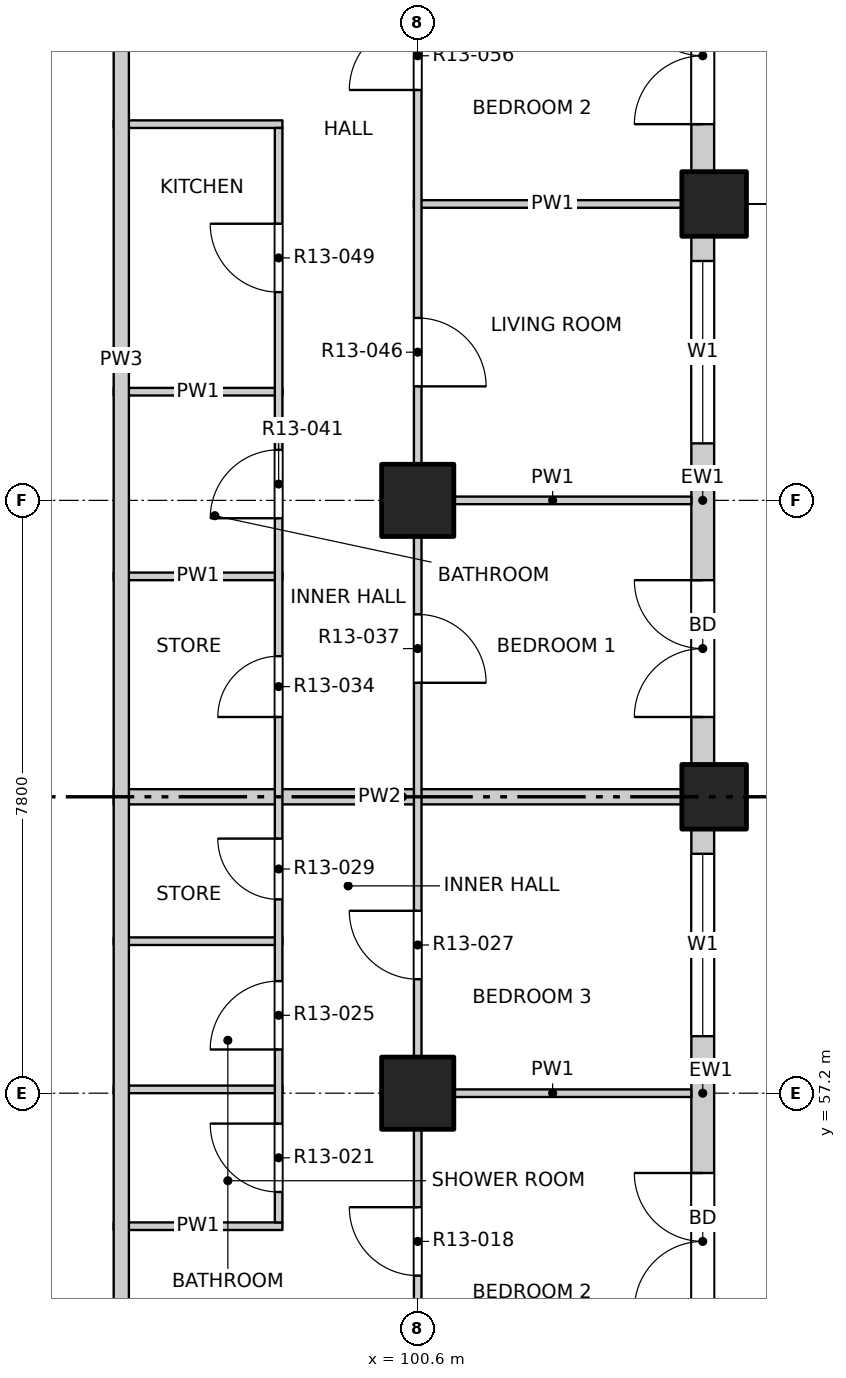
"""IFC4 building model, lengths in metres.
Left out: names, types, materials, properties, quantities, classifications, styles, units other than length and angle.
Written with IfcOpenShell. Run it as: python <this file> out.ifc"""

import sys

from ifc_helpers import new_model, si_unit, direction, frame, frame_2d, origin, origin_2d, place, context, subcontext, project, spatial, rectangle, extrude, element, fill, save


model = new_model("IFC4")
c1 = context("Model", 3, precision=1e-05, world=origin(), true_north=direction((0.0, 1.0)))
c2 = subcontext(c1, "Body", "Model", "MODEL_VIEW")
j1 = project(units=[si_unit("LENGTHUNIT", "METRE"), si_unit("PLANEANGLEUNIT", "RADIAN")], contexts=[c1])
p1 = place(None, origin())
s1 = spatial("IfcSite", under=j1, at=p1, CompositionType="ELEMENT")
p2 = place(p1, origin())
s2 = spatial("IfcBuilding", under=s1, at=p2, CompositionType="ELEMENT")
p3 = place(p2, frame((0.0, 0.0, 140.7)))
s3 = spatial("IfcBuildingStorey", under=s2, at=p3, CompositionType="ELEMENT", Elevation=140.7)
for number, where, z_axis, x_axis in (
    (1, (104.5, 61.1, -0.25), (0.0, 0.0, 1.0), (1.0, 0.0, 0.0)),
    (2, (104.5, 68.9, -0.25), (0.0, 0.0, 1.0), (1.0, 0.0, 0.0)),
):
    element("IfcColumn", number, at=place(p3, frame(where, z_axis=z_axis, x_axis=x_axis)), inside=s3, PredefinedType="COLUMN", context=c2, shape_type="SweptSolid", body=[
        extrude(rectangle(XDim=0.85, YDim=0.85, at=origin_2d()), origin(), (0.0, 0.0, 1.0), 3.35),
    ])
for number, where, z_axis, x_axis in (
    (3, (100.6, 57.2, -0.25), (0.0, 0.0, 1.0), (1.0, 0.0, 0.0)),
    (4, (100.6, 65.0, -0.25), (0.0, 0.0, 1.0), (1.0, 0.0, 0.0)),
):
    element("IfcColumn", number, at=place(p3, frame(where, z_axis=z_axis, x_axis=x_axis)), inside=s3, PredefinedType="COLUMN", context=c2, shape_type="SweptSolid", body=[
        extrude(rectangle(XDim=0.95, YDim=0.95, at=origin_2d()), origin(), (0.0, 0.0, 1.0), 3.35),
    ])
p4 = place(p3, frame((104.35, 53.725, 0.0), z_axis=(0.0, 0.0, 1.0), x_axis=(0.0, 1.0, 0.0)))
e5 = element("IfcWall", 5, at=p4, inside=s3, PredefinedType="SOLIDWALL", context=c2, shape_type="SweptSolid", body=[
    extrude(rectangle(XDim=6.95, YDim=0.3, at=frame_2d((3.475, 0.0))), origin(), (0.0, 0.0, 1.0), 3.1),
])
p5 = place(p4, frame((0.625, 0.0, 0.0)))
e6 = element("IfcOpeningElement", 6, at=p5, cuts=e5, PredefinedType="OPENING", context=c2, shape_type="SweptSolid", body=[
    extrude(rectangle(XDim=1.8, YDim=2.4, at=frame_2d((0.9, 1.2))), frame((0.0, 0.16, 0.0), z_axis=(0.0, -1.0, 0.0), x_axis=(1.0, 0.0, 0.0)), (0.0, 0.0, 1.0), 0.32),
])
p6 = place(p4, frame((4.225, 0.0, 0.9)))
e7 = element("IfcOpeningElement", 7, at=p6, cuts=e5, PredefinedType="OPENING", context=c2, shape_type="SweptSolid", body=[
    extrude(rectangle(XDim=2.4, YDim=1.8, at=frame_2d((1.2, 0.9))), frame((0.0, 0.16, 0.0), z_axis=(0.0, -1.0, 0.0), x_axis=(1.0, 0.0, 0.0)), (0.0, 0.0, 1.0), 0.32),
])
p7 = place(p3, frame((104.35, 61.525, 0.0), z_axis=(0.0, 0.0, 1.0), x_axis=(0.0, 1.0, 0.0)))
e8 = element("IfcWall", 8, at=p7, inside=s3, PredefinedType="SOLIDWALL", context=c2, shape_type="SweptSolid", body=[
    extrude(rectangle(XDim=6.95, YDim=0.3, at=frame_2d((3.475, 0.0))), origin(), (0.0, 0.0, 1.0), 3.1),
])
p8 = place(p7, frame((0.625, 0.0, 0.0)))
e9 = element("IfcOpeningElement", 9, at=p8, cuts=e8, PredefinedType="OPENING", context=c2, shape_type="SweptSolid", body=[
    extrude(rectangle(XDim=1.8, YDim=2.4, at=frame_2d((0.9, 1.2))), frame((0.0, 0.16, 0.0), z_axis=(0.0, -1.0, 0.0), x_axis=(1.0, 0.0, 0.0)), (0.0, 0.0, 1.0), 0.32),
])
p9 = place(p7, frame((4.225, 0.0, 0.9)))
e10 = element("IfcOpeningElement", 10, at=p9, cuts=e8, PredefinedType="OPENING", context=c2, shape_type="SweptSolid", body=[
    extrude(rectangle(XDim=2.4, YDim=1.8, at=frame_2d((1.2, 0.9))), frame((0.0, 0.16, 0.0), z_axis=(0.0, -1.0, 0.0), x_axis=(1.0, 0.0, 0.0)), (0.0, 0.0, 1.0), 0.32),
])
p10 = place(p3, frame((104.35, 69.325, 0.0), z_axis=(0.0, 0.0, 1.0), x_axis=(0.0, 1.0, 0.0)))
e11 = element("IfcWall", 11, at=p10, inside=s3, PredefinedType="SOLIDWALL", context=c2, shape_type="SweptSolid", body=[
    extrude(rectangle(XDim=6.95, YDim=0.3, at=frame_2d((3.475, 0.0))), origin(), (0.0, 0.0, 1.0), 3.1),
])
p11 = place(p10, frame((0.625, 0.0, 0.0)))
e12 = element("IfcOpeningElement", 12, at=p11, cuts=e11, PredefinedType="OPENING", context=c2, shape_type="SweptSolid", body=[
    extrude(rectangle(XDim=1.8, YDim=2.4, at=frame_2d((0.9, 1.2))), frame((0.0, 0.16, 0.0), z_axis=(0.0, -1.0, 0.0), x_axis=(1.0, 0.0, 0.0)), (0.0, 0.0, 1.0), 0.32),
])
p12 = place(p10, frame((4.225, 0.0, 0.9)))
e13 = element("IfcOpeningElement", 13, at=p12, cuts=e11, PredefinedType="OPENING", context=c2, shape_type="SweptSolid", body=[
    extrude(rectangle(XDim=2.4, YDim=1.8, at=frame_2d((1.2, 0.9))), frame((0.0, 0.16, 0.0), z_axis=(0.0, -1.0, 0.0), x_axis=(1.0, 0.0, 0.0)), (0.0, 0.0, 1.0), 0.32),
])
p13 = place(p3, frame((96.6, 55.45, 0.0), z_axis=(0.0, 0.0, 1.0), x_axis=(1.0, 0.0, 0.0)))
e14 = element("IfcWall", 14, at=p13, inside=s3, PredefinedType="PARTITIONING", context=c2, shape_type="SweptSolid", body=[
    extrude(rectangle(XDim=2.22, YDim=0.1, at=frame_2d((1.11, 0.0))), origin(), (0.0, 0.0, 1.0), 3.1),
])
p14 = place(p3, frame((100.55, 57.2, 0.0), z_axis=(0.0, 0.0, 1.0), x_axis=(1.0, 0.0, 0.0)))
e15 = element("IfcWall", 15, at=p14, inside=s3, PredefinedType="PARTITIONING", context=c2, shape_type="SweptSolid", body=[
    extrude(rectangle(XDim=3.65, YDim=0.1, at=frame_2d((1.825, 0.0))), origin(), (0.0, 0.0, 1.0), 3.1),
])
for number, where, z_axis, x_axis in (
    (16, (96.6, 57.25, 0.0), (0.0, 0.0, 1.0), (1.0, 0.0, 0.0)),
    (17, (96.6, 59.2, 0.0), (0.0, 0.0, 1.0), (1.0, 0.0, 0.0)),
):
    element("IfcWall", number, at=place(p3, frame(where, z_axis=z_axis, x_axis=x_axis)), inside=s3, PredefinedType="PARTITIONING", context=c2, shape_type="SweptSolid", body=[
        extrude(rectangle(XDim=2.22, YDim=0.1, at=frame_2d((1.11, 0.0))), origin(), (0.0, 0.0, 1.0), 3.1),
    ])
p15 = place(p3, frame((96.6, 61.1, 0.0), z_axis=(0.0, 0.0, 1.0), x_axis=(1.0, 0.0, 0.0)))
e18 = element("IfcWall", 18, at=p15, inside=s3, PredefinedType="PARTITIONING", context=c2, shape_type="SweptSolid", body=[
    extrude(rectangle(XDim=7.6, YDim=0.2, at=frame_2d((3.8, 0.0))), origin(), (0.0, 0.0, 1.0), 3.1),
])
p16 = place(p3, frame((96.6, 64.0, 0.0), z_axis=(0.0, 0.0, 1.0), x_axis=(1.0, 0.0, 0.0)))
e19 = element("IfcWall", 19, at=p16, inside=s3, PredefinedType="PARTITIONING", context=c2, shape_type="SweptSolid", body=[
    extrude(rectangle(XDim=2.22, YDim=0.1, at=frame_2d((1.11, 0.0))), origin(), (0.0, 0.0, 1.0), 3.1),
])
p17 = place(p3, frame((100.55, 65.0, 0.0), z_axis=(0.0, 0.0, 1.0), x_axis=(1.0, 0.0, 0.0)))
e20 = element("IfcWall", 20, at=p17, inside=s3, PredefinedType="PARTITIONING", context=c2, shape_type="SweptSolid", body=[
    extrude(rectangle(XDim=3.65, YDim=0.1, at=frame_2d((1.825, 0.0))), origin(), (0.0, 0.0, 1.0), 3.1),
])
p18 = place(p3, frame((96.6, 66.43, 0.0), z_axis=(0.0, 0.0, 1.0), x_axis=(1.0, 0.0, 0.0)))
e21 = element("IfcWall", 21, at=p18, inside=s3, PredefinedType="PARTITIONING", context=c2, shape_type="SweptSolid", body=[
    extrude(rectangle(XDim=2.22, YDim=0.1, at=frame_2d((1.11, 0.0))), origin(), (0.0, 0.0, 1.0), 3.1),
])
p19 = place(p3, frame((100.55, 68.9, 0.0), z_axis=(0.0, 0.0, 1.0), x_axis=(1.0, 0.0, 0.0)))
e22 = element("IfcWall", 22, at=p19, inside=s3, PredefinedType="PARTITIONING", context=c2, shape_type="SweptSolid", body=[
    extrude(rectangle(XDim=3.65, YDim=0.1, at=frame_2d((1.825, 0.0))), origin(), (0.0, 0.0, 1.0), 3.1),
])
p20 = place(p3, frame((96.6, 69.95, 0.0), z_axis=(0.0, 0.0, 1.0), x_axis=(1.0, 0.0, 0.0)))
e23 = element("IfcWall", 23, at=p20, inside=s3, PredefinedType="PARTITIONING", context=c2, shape_type="SweptSolid", body=[
    extrude(rectangle(XDim=2.22, YDim=0.1, at=frame_2d((1.11, 0.0))), origin(), (0.0, 0.0, 1.0), 3.1),
])
p21 = place(p3, frame((96.7, 49.5, 0.0), z_axis=(0.0, 0.0, 1.0), x_axis=(0.0, 1.0, 0.0)))
e24 = element("IfcWall", 24, at=p21, inside=s3, PredefinedType="PARTITIONING", context=c2, shape_type="SweptSolid", body=[
    extrude(rectangle(XDim=34.7, YDim=0.2, at=frame_2d((17.35, 0.0))), origin(), (0.0, 0.0, 1.0), 3.1),
])
p22 = place(p21, frame((3.675, 0.0, 0.0)))
e25 = element("IfcOpeningElement", 25, at=p22, cuts=e24, PredefinedType="OPENING", context=c2, shape_type="SweptSolid", body=[
    extrude(rectangle(XDim=1.0, YDim=2.1, at=frame_2d((0.5, 1.05))), frame((0.0, 0.11, 0.0), z_axis=(0.0, -1.0, 0.0), x_axis=(1.0, 0.0, 0.0)), (0.0, 0.0, 1.0), 0.22),
])
p23 = place(p21, frame((21.725, 0.0, 0.0)))
e26 = element("IfcOpeningElement", 26, at=p23, cuts=e24, PredefinedType="OPENING", context=c2, shape_type="SweptSolid", body=[
    extrude(rectangle(XDim=1.0, YDim=2.1, at=frame_2d((0.5, 1.05))), frame((0.0, 0.11, 0.0), z_axis=(0.0, -1.0, 0.0), x_axis=(1.0, 0.0, 0.0)), (0.0, 0.0, 1.0), 0.22),
])
p24 = place(p21, frame((29.125, 0.0, 0.0)))
e27 = element("IfcOpeningElement", 27, at=p24, cuts=e24, PredefinedType="OPENING", context=c2, shape_type="SweptSolid", body=[
    extrude(rectangle(XDim=1.0, YDim=2.1, at=frame_2d((0.5, 1.05))), frame((0.0, 0.11, 0.0), z_axis=(0.0, -1.0, 0.0), x_axis=(1.0, 0.0, 0.0)), (0.0, 0.0, 1.0), 0.22),
])
p25 = place(p3, frame((98.77, 55.5, 0.0), z_axis=(0.0, 0.0, 1.0), x_axis=(0.0, 1.0, 0.0)))
e28 = element("IfcWall", 28, at=p25, inside=s3, PredefinedType="PARTITIONING", context=c2, shape_type="SweptSolid", body=[
    extrude(rectangle(XDim=14.4, YDim=0.1, at=frame_2d((7.2, 0.0))), origin(), (0.0, 0.0, 1.0), 3.1),
])
p26 = place(p25, frame((0.4, 0.0, 0.0)))
e29 = element("IfcOpeningElement", 29, at=p26, cuts=e28, PredefinedType="OPENING", context=c2, shape_type="SweptSolid", body=[
    extrude(rectangle(XDim=0.9, YDim=2.1, at=frame_2d((0.45, 1.05))), frame((0.0, 0.06, 0.0), z_axis=(0.0, -1.0, 0.0), x_axis=(1.0, 0.0, 0.0)), (0.0, 0.0, 1.0), 0.12),
])
p27 = place(p25, frame((2.275, 0.0, 0.0)))
e30 = element("IfcOpeningElement", 30, at=p27, cuts=e28, PredefinedType="OPENING", context=c2, shape_type="SweptSolid", body=[
    extrude(rectangle(XDim=0.9, YDim=2.1, at=frame_2d((0.45, 1.05))), frame((0.0, 0.06, 0.0), z_axis=(0.0, -1.0, 0.0), x_axis=(1.0, 0.0, 0.0)), (0.0, 0.0, 1.0), 0.12),
])
p28 = place(p25, frame((4.25, 0.0, 0.0)))
e31 = element("IfcOpeningElement", 31, at=p28, cuts=e28, PredefinedType="OPENING", context=c2, shape_type="SweptSolid", body=[
    extrude(rectangle(XDim=0.8, YDim=2.1, at=frame_2d((0.4, 1.05))), frame((0.0, 0.06, 0.0), z_axis=(0.0, -1.0, 0.0), x_axis=(1.0, 0.0, 0.0)), (0.0, 0.0, 1.0), 0.12),
])
p29 = place(p25, frame((6.65, 0.0, 0.0)))
e32 = element("IfcOpeningElement", 32, at=p29, cuts=e28, PredefinedType="OPENING", context=c2, shape_type="SweptSolid", body=[
    extrude(rectangle(XDim=0.8, YDim=2.1, at=frame_2d((0.4, 1.05))), frame((0.0, 0.06, 0.0), z_axis=(0.0, -1.0, 0.0), x_axis=(1.0, 0.0, 0.0)), (0.0, 0.0, 1.0), 0.12),
])
p30 = place(p25, frame((9.265, 0.0, 0.0)))
e33 = element("IfcOpeningElement", 33, at=p30, cuts=e28, PredefinedType="OPENING", context=c2, shape_type="SweptSolid", body=[
    extrude(rectangle(XDim=0.9, YDim=2.1, at=frame_2d((0.45, 1.05))), frame((0.0, 0.06, 0.0), z_axis=(0.0, -1.0, 0.0), x_axis=(1.0, 0.0, 0.0)), (0.0, 0.0, 1.0), 0.12),
])
p31 = place(p25, frame((12.24, 0.0, 0.0)))
e34 = element("IfcOpeningElement", 34, at=p31, cuts=e28, PredefinedType="OPENING", context=c2, shape_type="SweptSolid", body=[
    extrude(rectangle(XDim=0.9, YDim=2.1, at=frame_2d((0.45, 1.05))), frame((0.0, 0.06, 0.0), z_axis=(0.0, -1.0, 0.0), x_axis=(1.0, 0.0, 0.0)), (0.0, 0.0, 1.0), 0.12),
])
p32 = place(p3, frame((100.6, 45.8, 0.0), z_axis=(0.0, 0.0, 1.0), x_axis=(0.0, 1.0, 0.0)))
e35 = element("IfcWall", 35, at=p32, inside=s3, PredefinedType="PARTITIONING", context=c2, shape_type="SweptSolid", body=[
    extrude(rectangle(XDim=38.4, YDim=0.1, at=frame_2d((19.2, 0.0))), origin(), (0.0, 0.0, 1.0), 3.1),
])
p33 = place(p32, frame((1.05, 0.0, 0.0)))
e36 = element("IfcOpeningElement", 36, at=p33, cuts=e35, PredefinedType="OPENING", context=c2, shape_type="SweptSolid", body=[
    extrude(rectangle(XDim=1.2, YDim=2.1, at=frame_2d((0.6, 1.05))), frame((0.0, 0.06, 0.0), z_axis=(0.0, -1.0, 0.0), x_axis=(1.0, 0.0, 0.0)), (0.0, 0.0, 1.0), 0.12),
])
p34 = place(p32, frame((5.1, 0.0, 0.0)))
e37 = element("IfcOpeningElement", 37, at=p34, cuts=e35, PredefinedType="OPENING", context=c2, shape_type="SweptSolid", body=[
    extrude(rectangle(XDim=0.9, YDim=2.1, at=frame_2d((0.45, 1.05))), frame((0.0, 0.06, 0.0), z_axis=(0.0, -1.0, 0.0), x_axis=(1.0, 0.0, 0.0)), (0.0, 0.0, 1.0), 0.12),
])
p35 = place(p32, frame((9.0, 0.0, 0.0)))
e38 = element("IfcOpeningElement", 38, at=p35, cuts=e35, PredefinedType="OPENING", context=c2, shape_type="SweptSolid", body=[
    extrude(rectangle(XDim=0.9, YDim=2.1, at=frame_2d((0.45, 1.05))), frame((0.0, 0.06, 0.0), z_axis=(0.0, -1.0, 0.0), x_axis=(1.0, 0.0, 0.0)), (0.0, 0.0, 1.0), 0.12),
])
p36 = place(p32, frame((12.9, 0.0, 0.0)))
e39 = element("IfcOpeningElement", 39, at=p36, cuts=e35, PredefinedType="OPENING", context=c2, shape_type="SweptSolid", body=[
    extrude(rectangle(XDim=0.9, YDim=2.1, at=frame_2d((0.45, 1.05))), frame((0.0, 0.06, 0.0), z_axis=(0.0, -1.0, 0.0), x_axis=(1.0, 0.0, 0.0)), (0.0, 0.0, 1.0), 0.12),
])
p37 = place(p32, frame((16.8, 0.0, 0.0)))
e40 = element("IfcOpeningElement", 40, at=p37, cuts=e35, PredefinedType="OPENING", context=c2, shape_type="SweptSolid", body=[
    extrude(rectangle(XDim=0.9, YDim=2.1, at=frame_2d((0.45, 1.05))), frame((0.0, 0.06, 0.0), z_axis=(0.0, -1.0, 0.0), x_axis=(1.0, 0.0, 0.0)), (0.0, 0.0, 1.0), 0.12),
])
p38 = place(p32, frame((20.7, 0.0, 0.0)))
e41 = element("IfcOpeningElement", 41, at=p38, cuts=e35, PredefinedType="OPENING", context=c2, shape_type="SweptSolid", body=[
    extrude(rectangle(XDim=0.9, YDim=2.1, at=frame_2d((0.45, 1.05))), frame((0.0, 0.06, 0.0), z_axis=(0.0, -1.0, 0.0), x_axis=(1.0, 0.0, 0.0)), (0.0, 0.0, 1.0), 0.12),
])
p39 = place(p32, frame((24.6, 0.0, 0.0)))
e42 = element("IfcOpeningElement", 42, at=p39, cuts=e35, PredefinedType="OPENING", context=c2, shape_type="SweptSolid", body=[
    extrude(rectangle(XDim=0.9, YDim=2.1, at=frame_2d((0.45, 1.05))), frame((0.0, 0.06, 0.0), z_axis=(0.0, -1.0, 0.0), x_axis=(1.0, 0.0, 0.0)), (0.0, 0.0, 1.0), 0.12),
])
p40 = place(p32, frame((28.5, 0.0, 0.0)))
e43 = element("IfcOpeningElement", 43, at=p40, cuts=e35, PredefinedType="OPENING", context=c2, shape_type="SweptSolid", body=[
    extrude(rectangle(XDim=0.9, YDim=2.1, at=frame_2d((0.45, 1.05))), frame((0.0, 0.06, 0.0), z_axis=(0.0, -1.0, 0.0), x_axis=(1.0, 0.0, 0.0)), (0.0, 0.0, 1.0), 0.12),
])
p41 = place(p32, frame((32.4, 0.0, 0.0)))
e44 = element("IfcOpeningElement", 44, at=p41, cuts=e35, PredefinedType="OPENING", context=c2, shape_type="SweptSolid", body=[
    extrude(rectangle(XDim=0.9, YDim=2.1, at=frame_2d((0.45, 1.05))), frame((0.0, 0.06, 0.0), z_axis=(0.0, -1.0, 0.0), x_axis=(1.0, 0.0, 0.0)), (0.0, 0.0, 1.0), 0.12),
])
p42 = place(p32, frame((36.15, 0.0, 0.0)))
e45 = element("IfcOpeningElement", 45, at=p42, cuts=e35, PredefinedType="OPENING", context=c2, shape_type="SweptSolid", body=[
    extrude(rectangle(XDim=1.2, YDim=2.1, at=frame_2d((0.6, 1.05))), frame((0.0, 0.06, 0.0), z_axis=(0.0, -1.0, 0.0), x_axis=(1.0, 0.0, 0.0)), (0.0, 0.0, 1.0), 0.12),
])
p43 = place(p5, origin())
e46 = element("IfcDoor", 46, at=p43, inside=s3, OperationType="DOUBLE_DOOR_SINGLE_SWING", PredefinedType="DOOR", context=c2, shape_type="SweptSolid", body=[
    extrude(rectangle(XDim=1.8, YDim=2.4, at=frame_2d((0.9, 1.2))), frame((0.0, 0.025, 0.0), z_axis=(0.0, -1.0, 0.0), x_axis=(1.0, 0.0, 0.0)), (0.0, 0.0, 1.0), 0.05),
])
fill(e6, e46)
p44 = place(p6, origin())
e47 = element("IfcWindow", 47, at=p44, inside=s3, PartitioningType="DOUBLE_PANEL_VERTICAL", PredefinedType="WINDOW", context=c2, shape_type="SweptSolid", body=[
    extrude(rectangle(XDim=2.4, YDim=1.8, at=frame_2d((1.2, 0.9))), frame((0.0, 0.03, 0.0), z_axis=(0.0, -1.0, 0.0), x_axis=(1.0, 0.0, 0.0)), (0.0, 0.0, 1.0), 0.06),
])
fill(e7, e47)
p45 = place(p8, origin())
e48 = element("IfcDoor", 48, at=p45, inside=s3, OperationType="DOUBLE_DOOR_SINGLE_SWING", PredefinedType="DOOR", context=c2, shape_type="SweptSolid", body=[
    extrude(rectangle(XDim=1.8, YDim=2.4, at=frame_2d((0.9, 1.2))), frame((0.0, 0.025, 0.0), z_axis=(0.0, -1.0, 0.0), x_axis=(1.0, 0.0, 0.0)), (0.0, 0.0, 1.0), 0.05),
])
fill(e9, e48)
p46 = place(p9, origin())
e49 = element("IfcWindow", 49, at=p46, inside=s3, PartitioningType="DOUBLE_PANEL_VERTICAL", PredefinedType="WINDOW", context=c2, shape_type="SweptSolid", body=[
    extrude(rectangle(XDim=2.4, YDim=1.8, at=frame_2d((1.2, 0.9))), frame((0.0, 0.03, 0.0), z_axis=(0.0, -1.0, 0.0), x_axis=(1.0, 0.0, 0.0)), (0.0, 0.0, 1.0), 0.06),
])
fill(e10, e49)
p47 = place(p11, origin())
e50 = element("IfcDoor", 50, at=p47, inside=s3, OperationType="DOUBLE_DOOR_SINGLE_SWING", PredefinedType="DOOR", context=c2, shape_type="SweptSolid", body=[
    extrude(rectangle(XDim=1.8, YDim=2.4, at=frame_2d((0.9, 1.2))), frame((0.0, 0.025, 0.0), z_axis=(0.0, -1.0, 0.0), x_axis=(1.0, 0.0, 0.0)), (0.0, 0.0, 1.0), 0.05),
])
fill(e12, e50)
p48 = place(p35, origin())
e51 = element("IfcDoor", 51, at=p48, inside=s3, OperationType="SINGLE_SWING_RIGHT", PredefinedType="DOOR", context=c2, shape_type="SweptSolid", body=[
    extrude(rectangle(XDim=0.9, YDim=2.1, at=frame_2d((0.45, 1.05))), frame((0.0, 0.025, 0.0), z_axis=(0.0, -1.0, 0.0), x_axis=(1.0, 0.0, 0.0)), (0.0, 0.0, 1.0), 0.05),
])
fill(e38, e51)
p49 = place(p26, origin())
e52 = element("IfcDoor", 52, at=p49, inside=s3, OperationType="SINGLE_SWING_RIGHT", PredefinedType="DOOR", context=c2, shape_type="SweptSolid", body=[
    extrude(rectangle(XDim=0.9, YDim=2.1, at=frame_2d((0.45, 1.05))), frame((0.0, 0.025, 0.0), z_axis=(0.0, -1.0, 0.0), x_axis=(1.0, 0.0, 0.0)), (0.0, 0.0, 1.0), 0.05),
])
fill(e29, e52)
p50 = place(p27, origin())
e53 = element("IfcDoor", 53, at=p50, inside=s3, OperationType="SINGLE_SWING_LEFT", PredefinedType="DOOR", context=c2, shape_type="SweptSolid", body=[
    extrude(rectangle(XDim=0.9, YDim=2.1, at=frame_2d((0.45, 1.05))), frame((0.0, 0.025, 0.0), z_axis=(0.0, -1.0, 0.0), x_axis=(1.0, 0.0, 0.0)), (0.0, 0.0, 1.0), 0.05),
])
fill(e30, e53)
p51 = place(p36, origin())
e54 = element("IfcDoor", 54, at=p51, inside=s3, OperationType="SINGLE_SWING_RIGHT", PredefinedType="DOOR", context=c2, shape_type="SweptSolid", body=[
    extrude(rectangle(XDim=0.9, YDim=2.1, at=frame_2d((0.45, 1.05))), frame((0.0, 0.025, 0.0), z_axis=(0.0, -1.0, 0.0), x_axis=(1.0, 0.0, 0.0)), (0.0, 0.0, 1.0), 0.05),
])
fill(e39, e54)
p52 = place(p28, origin())
e55 = element("IfcDoor", 55, at=p52, inside=s3, OperationType="SINGLE_SWING_RIGHT", PredefinedType="DOOR", context=c2, shape_type="SweptSolid", body=[
    extrude(rectangle(XDim=0.8, YDim=2.1, at=frame_2d((0.4, 1.05))), frame((0.0, 0.025, 0.0), z_axis=(0.0, -1.0, 0.0), x_axis=(1.0, 0.0, 0.0)), (0.0, 0.0, 1.0), 0.05),
])
fill(e31, e55)
p53 = place(p29, origin())
e56 = element("IfcDoor", 56, at=p53, inside=s3, OperationType="SINGLE_SWING_LEFT", PredefinedType="DOOR", context=c2, shape_type="SweptSolid", body=[
    extrude(rectangle(XDim=0.8, YDim=2.1, at=frame_2d((0.4, 1.05))), frame((0.0, 0.025, 0.0), z_axis=(0.0, -1.0, 0.0), x_axis=(1.0, 0.0, 0.0)), (0.0, 0.0, 1.0), 0.05),
])
fill(e32, e56)
p54 = place(p37, origin())
e57 = element("IfcDoor", 57, at=p54, inside=s3, OperationType="SINGLE_SWING_RIGHT", PredefinedType="DOOR", context=c2, shape_type="SweptSolid", body=[
    extrude(rectangle(XDim=0.9, YDim=2.1, at=frame_2d((0.45, 1.05))), frame((0.0, 0.025, 0.0), z_axis=(0.0, -1.0, 0.0), x_axis=(1.0, 0.0, 0.0)), (0.0, 0.0, 1.0), 0.05),
])
fill(e40, e57)
p55 = place(p30, origin())
e58 = element("IfcDoor", 58, at=p55, inside=s3, OperationType="SINGLE_SWING_LEFT", PredefinedType="DOOR", context=c2, shape_type="SweptSolid", body=[
    extrude(rectangle(XDim=0.9, YDim=2.1, at=frame_2d((0.45, 1.05))), frame((0.0, 0.025, 0.0), z_axis=(0.0, -1.0, 0.0), x_axis=(1.0, 0.0, 0.0)), (0.0, 0.0, 1.0), 0.05),
])
fill(e33, e58)
p56 = place(p38, origin())
e59 = element("IfcDoor", 59, at=p56, inside=s3, OperationType="SINGLE_SWING_RIGHT", PredefinedType="DOOR", context=c2, shape_type="SweptSolid", body=[
    extrude(rectangle(XDim=0.9, YDim=2.1, at=frame_2d((0.45, 1.05))), frame((0.0, 0.025, 0.0), z_axis=(0.0, -1.0, 0.0), x_axis=(1.0, 0.0, 0.0)), (0.0, 0.0, 1.0), 0.05),
])
fill(e41, e59)
p57 = place(p31, origin())
e60 = element("IfcDoor", 60, at=p57, inside=s3, OperationType="SINGLE_SWING_RIGHT", PredefinedType="DOOR", context=c2, shape_type="SweptSolid", body=[
    extrude(rectangle(XDim=0.9, YDim=2.1, at=frame_2d((0.45, 1.05))), frame((0.0, 0.025, 0.0), z_axis=(0.0, -1.0, 0.0), x_axis=(1.0, 0.0, 0.0)), (0.0, 0.0, 1.0), 0.05),
])
fill(e34, e60)
p58 = place(p39, origin())
e61 = element("IfcDoor", 61, at=p58, inside=s3, OperationType="SINGLE_SWING_LEFT", PredefinedType="DOOR", context=c2, shape_type="SweptSolid", body=[
    extrude(rectangle(XDim=0.9, YDim=2.1, at=frame_2d((0.45, 1.05))), frame((0.0, 0.025, 0.0), z_axis=(0.0, -1.0, 0.0), x_axis=(1.0, 0.0, 0.0)), (0.0, 0.0, 1.0), 0.05),
])
fill(e42, e61)
save(model, sys.argv[1])
